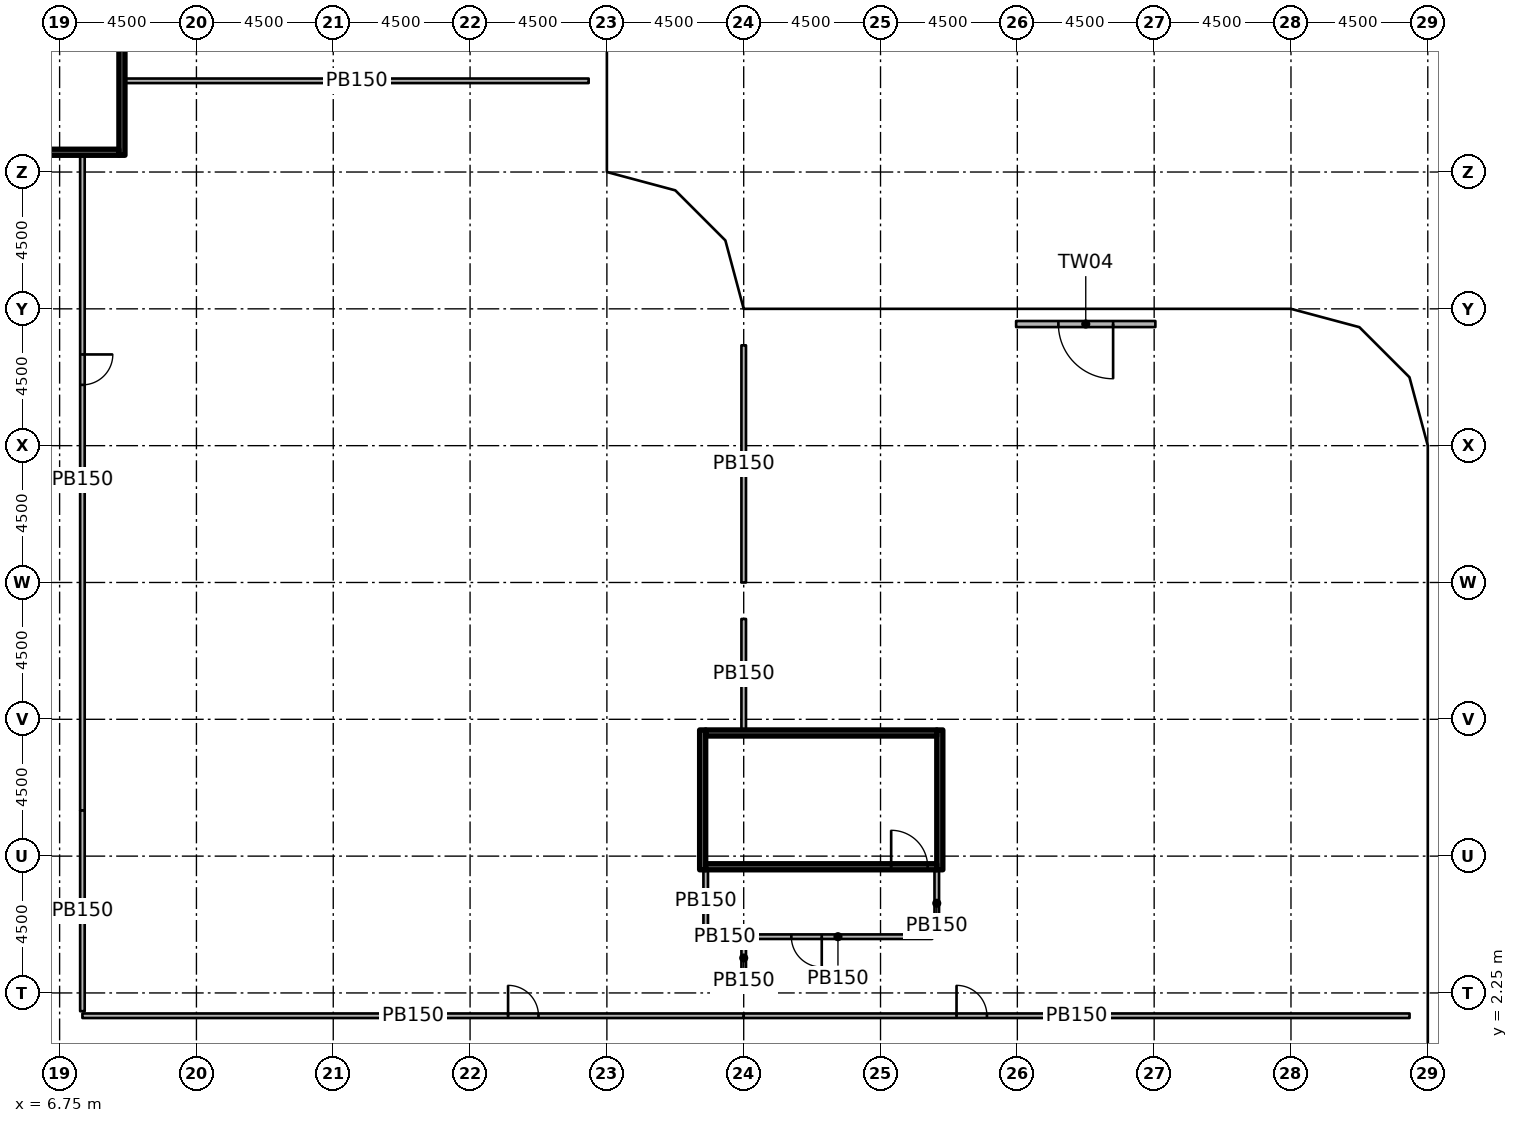
"""IFC4 building model, lengths in metres.
Left out: names, types, materials, properties, quantities, classifications, styles, units other than length and angle.
Written with IfcOpenShell. Run it as: python <this file> out.ifc"""

import sys

from ifc_helpers import new_model, si_unit, direction, frame, frame_2d, origin, origin_2d, place, context, subcontext, project, spatial, rectangle, extrude, element, fill, save


model = new_model("IFC4")
c1 = context("Model", 3, precision=1e-05, world=origin(), true_north=direction((0.0, 1.0)))
c2 = subcontext(c1, "Body", "Model", "MODEL_VIEW")
j1 = project(units=[si_unit("LENGTHUNIT", "METRE"), si_unit("PLANEANGLEUNIT", "RADIAN")], contexts=[c1])
p1 = place(None, origin())
s1 = spatial("IfcSite", under=j1, at=p1, CompositionType="ELEMENT")
p2 = place(p1, origin())
s2 = spatial("IfcBuilding", under=s1, at=p2, CompositionType="ELEMENT")
p3 = place(p2, frame((0.0, 0.0, 7.0)))
s3 = spatial("IfcBuildingStorey", under=s2, at=p3, CompositionType="ELEMENT", Elevation=7.0)
for number, where, z_axis, x_axis in (
    (1, (6.25, 6.25, 0.0), (0.0, 0.0, 1.0), (1.0, 0.0, 0.0)),
    (2, (6.25, 10.75, 0.0), (0.0, 0.0, 1.0), (1.0, 0.0, 0.0)),
    (3, (6.25, 15.75, 0.0), (0.0, 0.0, 1.0), (1.0, 0.0, 0.0)),
    (4, (6.25, 20.25, 0.0), (0.0, 0.0, 1.0), (1.0, 0.0, 0.0)),
    (5, (6.25, 24.65, 0.0), (0.0, 0.0, 1.0), (1.0, 0.0, 0.0)),
    (6, (6.25, 26.7, 0.0), (0.0, 0.0, 1.0), (1.0, 0.0, 0.0)),
    (7, (10.75, 6.25, 0.0), (0.0, 0.0, 1.0), (1.0, 0.0, 0.0)),
    (8, (10.65, 15.15, 0.0), (0.0, 0.0, 1.0), (1.0, 0.0, 0.0)),
    (9, (10.65, 20.25, 0.0), (0.0, 0.0, 1.0), (1.0, 0.0, 0.0)),
    (10, (10.47, 33.75, 0.0), (0.0, 0.0, 1.0), (1.0, 0.0, 0.0)),
    (11, (15.75, 6.25, 0.0), (0.0, 0.0, 1.0), (1.0, 0.0, 0.0)),
    (12, (15.15, 10.65, 0.0), (0.0, 0.0, 1.0), (1.0, 0.0, 0.0)),
    (13, (15.15, 19.65, 0.0), (0.0, 0.0, 1.0), (1.0, 0.0, 0.0)),
    (14, (15.15, 29.25, 0.0), (0.0, 0.0, 1.0), (1.0, 0.0, 0.0)),
    (15, (20.25, 6.11, 0.0), (0.0, 0.0, 1.0), (1.0, 0.0, 0.0)),
    (16, (20.25, 10.65, 0.0), (0.0, 0.0, 1.0), (1.0, 0.0, 0.0)),
    (17, (19.65, 15.15, 0.0), (0.0, 0.0, 1.0), (1.0, 0.0, 0.0)),
    (18, (19.65, 24.15, 0.0), (0.0, 0.0, 1.0), (1.0, 0.0, 0.0)),
    (19, (24.75, 6.11, 0.0), (0.0, 0.0, 1.0), (1.0, 0.0, 0.0)),
    (20, (24.15, 19.65, 0.0), (0.0, 0.0, 1.0), (1.0, 0.0, 0.0)),
    (21, (24.15, 28.65, 0.0), (0.0, 0.0, 1.0), (1.0, 0.0, 0.0)),
    (22, (24.15, 33.75, 0.0), (0.0, 0.0, 1.0), (1.0, 0.0, 0.0)),
    (23, (28.67, 2.25, 0.0), (0.0, 0.0, 1.0), (1.0, 0.0, 0.0)),
    (24, (28.908, 5.475, 0.0), (0.0, 0.0, 1.0), (1.0, 0.0, 0.0)),
    (25, (29.25, 15.15, 0.0), (0.0, 0.0, 1.0), (1.0, 0.0, 0.0)),
    (26, (28.65, 24.15, 0.0), (0.0, 0.0, 1.0), (1.0, 0.0, 0.0)),
    (27, (33.11, 2.25, 0.0), (0.0, 0.0, 1.0), (1.0, 0.0, 0.0)),
    (28, (33.75, 24.15, 0.0), (0.0, 0.0, 1.0), (1.0, 0.0, 0.0)),
    (29, (37.47, 6.75, 0.0), (0.0, 0.0, 1.0), (1.0, 0.0, 0.0)),
    (30, (38.25, 19.65, 0.0), (0.0, 0.0, 1.0), (1.0, 0.0, 0.0)),
    (31, (42.15, 2.25, 0.0), (0.0, 0.0, 1.0), (1.0, 0.0, 0.0)),
    (32, (46.65, 11.25, 0.0), (0.0, 0.0, 1.0), (1.0, 0.0, 0.0)),
    (33, (47.25, 23.97, 0.0), (0.0, 0.0, 1.0), (1.0, 0.0, 0.0)),
    (34, (51.15, 6.75, 0.0), (0.0, 0.0, 1.0), (1.0, 0.0, 0.0)),
    (35, (50.97, 20.25, 0.0), (0.0, 0.0, 1.0), (1.0, 0.0, 0.0)),
):
    element("IfcColumn", number, at=place(p3, frame(where, z_axis=z_axis, x_axis=x_axis)), inside=s3, PredefinedType="COLUMN", context=c2, shape_type="SweptSolid", body=[
        extrude(rectangle(XDim=1.2, YDim=1.2, at=origin_2d()), origin(), (0.0, 0.0, 1.0), 4.55),
    ])
p4 = place(p3, frame((42.79, 24.25, 0.0), z_axis=(0.0, 0.0, 1.0), x_axis=(-1.0, 0.0, 0.0)))
e36 = element("IfcWall", 36, at=p4, inside=s3, PredefinedType="SOLIDWALL", context=c2, shape_type="SweptSolid", body=[
    extrude(rectangle(XDim=4.58, YDim=0.2, at=frame_2d((2.29, 0.0))), origin(), (0.0, 0.0, 1.0), 4.55),
])
p5 = place(p4, frame((1.39, 0.0, 0.0)))
e37 = element("IfcOpeningElement", 37, at=p5, cuts=e36, PredefinedType="OPENING", context=c2, shape_type="SweptSolid", body=[
    extrude(rectangle(XDim=1.8, YDim=2.4, at=frame_2d((0.9, 1.2))), frame((0.0, 0.11, 0.0), z_axis=(0.0, -1.0, 0.0), x_axis=(1.0, 0.0, 0.0)), (0.0, 0.0, 1.0), 0.22),
])
p6 = place(p3, frame((8.8, 29.8, 0.0), z_axis=(0.0, 0.0, 1.0), x_axis=(0.0, 1.0, 0.0)))
e38 = element("IfcWall", 38, at=p6, inside=s3, PredefinedType="SHEAR", context=c2, shape_type="SweptSolid", body=[
    extrude(rectangle(XDim=8.0, YDim=0.2, at=frame_2d((4.0, 0.0))), origin(), (0.0, 0.0, 1.0), 4.55),
])
p7 = place(p3, frame((4.5, 29.9, 0.0), z_axis=(0.0, 0.0, 1.0), x_axis=(1.0, 0.0, 0.0)))
e39 = element("IfcWall", 39, at=p7, inside=s3, PredefinedType="SHEAR", context=c2, shape_type="SweptSolid", body=[
    extrude(rectangle(XDim=4.2, YDim=0.2, at=frame_2d((2.1, 0.0))), origin(), (0.0, 0.0, 1.0), 4.55),
])
for number, where, z_axis, x_axis in (
    (40, (27.9, 6.3, 0.0), (0.0, 0.0, 1.0), (0.0, 1.0, 0.0)),
    (41, (35.7, 6.3, 0.0), (0.0, 0.0, 1.0), (0.0, 1.0, 0.0)),
):
    element("IfcWall", number, at=place(p3, frame(where, z_axis=z_axis, x_axis=x_axis)), inside=s3, PredefinedType="SHEAR", context=c2, shape_type="SweptSolid", body=[
        extrude(rectangle(XDim=4.6, YDim=0.2, at=frame_2d((2.3, 0.0))), origin(), (0.0, 0.0, 1.0), 4.55),
    ])
p8 = place(p3, frame((28.0, 6.4, 0.0), z_axis=(0.0, 0.0, 1.0), x_axis=(1.0, 0.0, 0.0)))
e42 = element("IfcWall", 42, at=p8, inside=s3, PredefinedType="SHEAR", context=c2, shape_type="SweptSolid", body=[
    extrude(rectangle(XDim=7.6, YDim=0.2, at=frame_2d((3.8, 0.0))), origin(), (0.0, 0.0, 1.0), 4.55),
])
p9 = place(p8, frame((6.1, 0.0, 0.0)))
e43 = element("IfcOpeningElement", 43, at=p9, cuts=e42, PredefinedType="OPENING", context=c2, shape_type="SweptSolid", body=[
    extrude(rectangle(XDim=1.2, YDim=2.1, at=frame_2d((0.6, 1.05))), frame((0.0, 0.11, 0.0), z_axis=(0.0, -1.0, 0.0), x_axis=(1.0, 0.0, 0.0)), (0.0, 0.0, 1.0), 0.22),
])
p10 = place(p3, frame((28.0, 10.8, 0.0), z_axis=(0.0, 0.0, 1.0), x_axis=(1.0, 0.0, 0.0)))
e44 = element("IfcWall", 44, at=p10, inside=s3, PredefinedType="SHEAR", context=c2, shape_type="SweptSolid", body=[
    extrude(rectangle(XDim=7.6, YDim=0.2, at=frame_2d((3.8, 0.0))), origin(), (0.0, 0.0, 1.0), 4.55),
])
p11 = place(p3, frame((29.25, 4.1, 0.0), z_axis=(0.0, 0.0, 1.0), x_axis=(-1.0, 0.0, 0.0)))
e45 = element("IfcWall", 45, at=p11, inside=s3, PredefinedType="PARTITIONING", context=c2, shape_type="SweptSolid", body=[
    extrude(rectangle(XDim=1.25, YDim=0.15, at=frame_2d((0.625, 0.0))), origin(), (0.0, 0.0, 1.0), 4.55),
])
p12 = place(p3, frame((28.0, 4.25, 0.0), z_axis=(0.0, 0.0, 1.0), x_axis=(0.0, 1.0, 0.0)))
e46 = element("IfcWall", 46, at=p12, inside=s3, PredefinedType="PARTITIONING", context=c2, shape_type="SweptSolid", body=[
    extrude(rectangle(XDim=2.05, YDim=0.15, at=frame_2d((1.025, 0.0))), origin(), (0.0, 0.0, 1.0), 4.55),
])
p13 = place(p3, frame((35.6, 6.3, 0.0), z_axis=(0.0, 0.0, 1.0), x_axis=(0.0, -1.0, 0.0)))
e47 = element("IfcWall", 47, at=p13, inside=s3, PredefinedType="PARTITIONING", context=c2, shape_type="SweptSolid", body=[
    extrude(rectangle(XDim=2.2, YDim=0.15, at=frame_2d((1.1, 0.0))), origin(), (0.0, 0.0, 1.0), 4.55),
])
p14 = place(p3, frame((35.45, 4.1, 0.0), z_axis=(0.0, 0.0, 1.0), x_axis=(-1.0, 0.0, 0.0)))
e48 = element("IfcWall", 48, at=p14, inside=s3, PredefinedType="PARTITIONING", context=c2, shape_type="SweptSolid", body=[
    extrude(rectangle(XDim=6.2, YDim=0.15, at=frame_2d((3.1, 0.0))), origin(), (0.0, 0.0, 1.0), 4.55),
])
p15 = place(p14, frame((3.633, 0.0, 0.0)))
e49 = element("IfcOpeningElement", 49, at=p15, cuts=e48, PredefinedType="OPENING", context=c2, shape_type="SweptSolid", body=[
    extrude(rectangle(XDim=1.0, YDim=2.1, at=frame_2d((0.5, 1.05))), frame((0.0, 0.085, 0.0), z_axis=(0.0, -1.0, 0.0), x_axis=(1.0, 0.0, 0.0)), (0.0, 0.0, 1.0), 0.17),
])
p16 = place(p3, frame((7.5, 30.0, 0.0), z_axis=(0.0, 0.0, 1.0), x_axis=(0.0, -1.0, 0.0)))
e50 = element("IfcWall", 50, at=p16, inside=s3, PredefinedType="PARTITIONING", context=c2, shape_type="SweptSolid", body=[
    extrude(rectangle(XDim=21.75, YDim=0.15, at=frame_2d((10.875, 0.0))), origin(), (0.0, 0.0, 1.0), 4.55),
])
p17 = place(p16, frame((6.75, 0.0, 0.0)))
e51 = element("IfcOpeningElement", 51, at=p17, cuts=e50, PredefinedType="OPENING", context=c2, shape_type="SweptSolid", body=[
    extrude(rectangle(XDim=1.0, YDim=2.1, at=frame_2d((0.5, 1.05))), frame((0.0, 0.085, 0.0), z_axis=(0.0, -1.0, 0.0), x_axis=(1.0, 0.0, 0.0)), (0.0, 0.0, 1.0), 0.17),
])
p18 = place(p3, frame((7.5, 1.5, 0.0), z_axis=(0.0, 0.0, 1.0), x_axis=(1.0, 0.0, 0.0)))
e52 = element("IfcWall", 52, at=p18, inside=s3, PredefinedType="PARTITIONING", context=c2, shape_type="SweptSolid", body=[
    extrude(rectangle(XDim=21.75, YDim=0.15, at=frame_2d((10.875, 0.0))), origin(), (0.0, 0.0, 1.0), 4.55),
])
p19 = place(p18, frame((14.0, 0.0, 0.0)))
e53 = element("IfcOpeningElement", 53, at=p19, cuts=e52, PredefinedType="OPENING", context=c2, shape_type="SweptSolid", body=[
    extrude(rectangle(XDim=1.0, YDim=2.1, at=frame_2d((0.5, 1.05))), frame((0.0, 0.085, 0.0), z_axis=(0.0, -1.0, 0.0), x_axis=(1.0, 0.0, 0.0)), (0.0, 0.0, 1.0), 0.17),
])
p20 = place(p3, frame((29.25, 1.5, 0.0), z_axis=(0.0, 0.0, 1.0), x_axis=(1.0, 0.0, 0.0)))
e54 = element("IfcWall", 54, at=p20, inside=s3, PredefinedType="PARTITIONING", context=c2, shape_type="SweptSolid", body=[
    extrude(rectangle(XDim=21.9, YDim=0.15, at=frame_2d((10.95, 0.0))), origin(), (0.0, 0.0, 1.0), 4.55),
])
p21 = place(p20, frame((7.0, 0.0, 0.0)))
e55 = element("IfcOpeningElement", 55, at=p21, cuts=e54, PredefinedType="OPENING", context=c2, shape_type="SweptSolid", body=[
    extrude(rectangle(XDim=1.0, YDim=2.1, at=frame_2d((0.5, 1.05))), frame((0.0, 0.085, 0.0), z_axis=(0.0, -1.0, 0.0), x_axis=(1.0, 0.0, 0.0)), (0.0, 0.0, 1.0), 0.17),
])
p22 = place(p3, frame((29.25, 3.95, 0.0), z_axis=(0.0, 0.0, 1.0), x_axis=(0.0, -1.0, 0.0)))
e56 = element("IfcWall", 56, at=p22, inside=s3, PredefinedType="PARTITIONING", context=c2, shape_type="SweptSolid", body=[
    extrude(rectangle(XDim=1.1, YDim=0.15, at=frame_2d((0.55, 0.0))), origin(), (0.0, 0.0, 1.0), 4.55),
])
p23 = place(p3, frame((29.25, 23.55, 0.0), z_axis=(0.0, 0.0, 1.0), x_axis=(0.0, -1.0, 0.0)))
e57 = element("IfcWall", 57, at=p23, inside=s3, PredefinedType="PARTITIONING", context=c2, shape_type="SweptSolid", body=[
    extrude(rectangle(XDim=7.8, YDim=0.15, at=frame_2d((3.9, 0.0))), origin(), (0.0, 0.0, 1.0), 4.55),
])
p24 = place(p3, frame((29.25, 14.55, 0.0), z_axis=(0.0, 0.0, 1.0), x_axis=(0.0, -1.0, 0.0)))
e58 = element("IfcWall", 58, at=p24, inside=s3, PredefinedType="PARTITIONING", context=c2, shape_type="SweptSolid", body=[
    extrude(rectangle(XDim=3.65, YDim=0.15, at=frame_2d((1.825, 0.0))), origin(), (0.0, 0.0, 1.0), 4.55),
])
p25 = place(p3, frame((8.9, 32.25, 0.0), z_axis=(0.0, 0.0, 1.0), x_axis=(1.0, 0.0, 0.0)))
e59 = element("IfcWall", 59, at=p25, inside=s3, PredefinedType="PARTITIONING", context=c2, shape_type="SweptSolid", body=[
    extrude(rectangle(XDim=15.25, YDim=0.15, at=frame_2d((7.625, 0.0))), origin(), (0.0, 0.0, 1.0), 4.55),
])
p26 = place(p3, frame((7.5, 1.65, 0.0), z_axis=(0.0, 0.0, 1.0), x_axis=(0.0, 1.0, 0.0)))
e60 = element("IfcWall", 60, at=p26, inside=s3, PredefinedType="PARTITIONING", context=c2, shape_type="SweptSolid", body=[
    extrude(rectangle(XDim=6.6, YDim=0.15, at=frame_2d((3.3, 0.0))), origin(), (0.0, 0.0, 1.0), 4.55),
])
p27 = place(p5, origin())
e61 = element("IfcDoor", 61, at=p27, inside=s3, OperationType="SINGLE_SWING_LEFT", PredefinedType="DOOR", context=c2, shape_type="SweptSolid", body=[
    extrude(rectangle(XDim=1.8, YDim=2.4, at=frame_2d((0.9, 1.2))), frame((0.0, 0.025, 0.0), z_axis=(0.0, -1.0, 0.0), x_axis=(1.0, 0.0, 0.0)), (0.0, 0.0, 1.0), 0.05),
])
fill(e37, e61)
p28 = place(p9, origin())
e62 = element("IfcDoor", 62, at=p28, inside=s3, OperationType="SINGLE_SWING_RIGHT", PredefinedType="DOOR", context=c2, shape_type="SweptSolid", body=[
    extrude(rectangle(XDim=1.2, YDim=2.1, at=frame_2d((0.6, 1.05))), frame((0.0, 0.025, 0.0), z_axis=(0.0, -1.0, 0.0), x_axis=(1.0, 0.0, 0.0)), (0.0, 0.0, 1.0), 0.05),
])
fill(e43, e62)
p29 = place(p15, origin())
e63 = element("IfcDoor", 63, at=p29, inside=s3, OperationType="SINGLE_SWING_LEFT", PredefinedType="DOOR", context=c2, shape_type="SweptSolid", body=[
    extrude(rectangle(XDim=1.0, YDim=2.1, at=frame_2d((0.5, 1.05))), frame((0.0, 0.025, 0.0), z_axis=(0.0, -1.0, 0.0), x_axis=(1.0, 0.0, 0.0)), (0.0, 0.0, 1.0), 0.05),
])
fill(e49, e63)
p30 = place(p17, origin())
e64 = element("IfcDoor", 64, at=p30, inside=s3, OperationType="SINGLE_SWING_LEFT", PredefinedType="DOOR", context=c2, shape_type="SweptSolid", body=[
    extrude(rectangle(XDim=1.0, YDim=2.1, at=frame_2d((0.5, 1.05))), frame((0.0, 0.025, 0.0), z_axis=(0.0, -1.0, 0.0), x_axis=(1.0, 0.0, 0.0)), (0.0, 0.0, 1.0), 0.05),
])
fill(e51, e64)
p31 = place(p19, origin())
e65 = element("IfcDoor", 65, at=p31, inside=s3, OperationType="SINGLE_SWING_LEFT", PredefinedType="DOOR", context=c2, shape_type="SweptSolid", body=[
    extrude(rectangle(XDim=1.0, YDim=2.1, at=frame_2d((0.5, 1.05))), frame((0.0, 0.025, 0.0), z_axis=(0.0, -1.0, 0.0), x_axis=(1.0, 0.0, 0.0)), (0.0, 0.0, 1.0), 0.05),
])
fill(e53, e65)
p32 = place(p21, origin())
e66 = element("IfcDoor", 66, at=p32, inside=s3, OperationType="SINGLE_SWING_LEFT", PredefinedType="DOOR", context=c2, shape_type="SweptSolid", body=[
    extrude(rectangle(XDim=1.0, YDim=2.1, at=frame_2d((0.5, 1.05))), frame((0.0, 0.025, 0.0), z_axis=(0.0, -1.0, 0.0), x_axis=(1.0, 0.0, 0.0)), (0.0, 0.0, 1.0), 0.05),
])
fill(e55, e66)
save(model, sys.argv[1])
